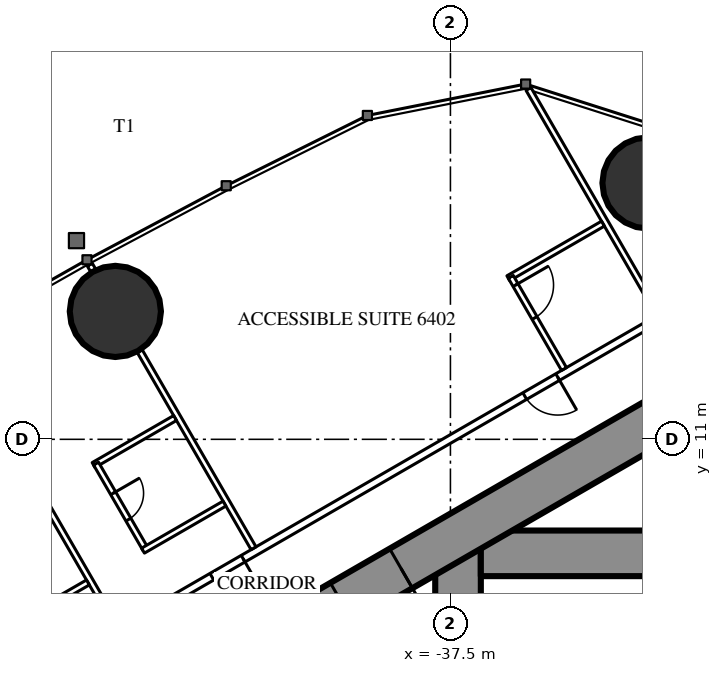
"""IFC4 building model, lengths in metres.
Left out: names, types, materials, properties, quantities, classifications, styles, units other than length and angle.
Written with IfcOpenShell. Run it as: python <this file> out.ifc"""

import sys

from ifc_helpers import new_model, si_unit, direction, frame, frame_2d, origin, origin_2d, place, context, subcontext, project, spatial, rectangle, circle, extrude, element, fill, save


model = new_model("IFC4")
c1 = context("Model", 3, precision=1e-05, world=origin(), true_north=direction((0.0, 1.0)))
c2 = subcontext(c1, "Body", "Model", "MODEL_VIEW")
j1 = project(units=[si_unit("LENGTHUNIT", "METRE"), si_unit("PLANEANGLEUNIT", "RADIAN")], contexts=[c1])
p1 = place(None, origin())
s1 = spatial("IfcSite", under=j1, at=p1, CompositionType="ELEMENT")
p2 = place(p1, origin())
s2 = spatial("IfcBuilding", under=s1, at=p2, CompositionType="ELEMENT")
p3 = place(p2, frame((0.0, 0.0, 240.5)))
s3 = spatial("IfcBuildingStorey", under=s2, at=p3, CompositionType="ELEMENT", Elevation=240.5)
for number, where, z_axis, x_axis in (
    (1, (-32.301, 17.745, 0.0), (0.0, 0.0, 1.0), (1.0, 0.0, 0.0)),
    (2, (-46.317, 14.365, 0.0), (0.0, 0.0, 1.0), (1.0, 0.0, 0.0)),
):
    element("IfcColumn", number, at=place(p3, frame(where, z_axis=z_axis, x_axis=x_axis)), inside=s3, PredefinedType="COLUMN", context=c2, shape_type="SweptSolid", body=[
        extrude(circle(Radius=1.2, at=origin_2d()), origin(), (0.0, 0.0, 1.0), 3.6),
    ])
p4 = place(p3, frame((-37.3, 8.6, 0.0), z_axis=(0.0, 0.0, 1.0), x_axis=(0.0, -1.0, 0.0)))
e3 = element("IfcWall", 3, at=p4, inside=s3, PredefinedType="SHEAR", context=c2, shape_type="SweptSolid", body=[
    extrude(rectangle(XDim=17.2, YDim=1.2, at=frame_2d((8.6, 0.0))), origin(), (0.0, 0.0, 1.0), 3.6),
])
p5 = place(p4, frame((7.7, 0.0, 0.0)))
e4 = element("IfcOpeningElement", 4, at=p5, cuts=e3, PredefinedType="OPENING", context=c2, shape_type="SweptSolid", body=[
    extrude(rectangle(XDim=1.8, YDim=2.2, at=frame_2d((0.9, 1.1))), frame((0.0, 0.61, 0.0), z_axis=(0.0, -1.0, 0.0), x_axis=(1.0, 0.0, 0.0)), (0.0, 0.0, 1.0), 1.22),
])
p6 = place(p3, frame((-28.3, 8.0, 0.0), z_axis=(0.0, 0.0, 1.0), x_axis=(-1.0, 0.0, 0.0)))
e5 = element("IfcWall", 5, at=p6, inside=s3, PredefinedType="SHEAR", context=c2, shape_type="SweptSolid", body=[
    extrude(rectangle(XDim=8.4, YDim=1.2, at=frame_2d((4.2, 0.0))), origin(), (0.0, 0.0, 1.0), 3.6),
])
p7 = place(p6, frame((0.25, 0.0, 0.0)))
e6 = element("IfcOpeningElement", 6, at=p7, cuts=e5, PredefinedType="OPENING", context=c2, shape_type="SweptSolid", body=[
    extrude(rectangle(XDim=1.0, YDim=2.2, at=frame_2d((0.5, 1.1))), frame((0.0, 0.61, 0.0), z_axis=(0.0, -1.0, 0.0), x_axis=(1.0, 0.0, 0.0)), (0.0, 0.0, 1.0), 1.22),
])
p8 = place(p3, frame((-27.2, 14.3, 0.0), z_axis=(0.0, 0.0, 1.0), x_axis=(-0.866026593062, -0.499997940104, 0.0)))
e7 = element("IfcWall", 7, at=p8, inside=s3, PredefinedType="SHEAR", context=c2, shape_type="SweptSolid", body=[
    extrude(rectangle(XDim=28.946, YDim=1.2, at=frame_2d((14.473, 0.0))), origin(), (0.0, 0.0, 1.0), 3.6),
])
p9 = place(p8, frame((4.6, 0.0, 0.0)))
e8 = element("IfcOpeningElement", 8, at=p9, cuts=e7, PredefinedType="OPENING", context=c2, shape_type="SweptSolid", body=[
    extrude(rectangle(XDim=1.0, YDim=2.2, at=frame_2d((0.5, 1.1))), frame((0.0, 0.61, 0.0), z_axis=(0.0, -1.0, 0.0), x_axis=(1.0, 0.0, 0.0)), (0.0, 0.0, 1.0), 1.22),
])
p10 = place(p8, frame((13.395, 0.0, 0.0)))
e9 = element("IfcOpeningElement", 9, at=p10, cuts=e7, PredefinedType="OPENING", context=c2, shape_type="SweptSolid", body=[
    extrude(rectangle(XDim=1.8, YDim=2.2, at=frame_2d((0.9, 1.1))), frame((0.0, 0.61, 0.0), z_axis=(0.0, -1.0, 0.0), x_axis=(1.0, 0.0, 0.0)), (0.0, 0.0, 1.0), 1.22),
])
p11 = place(p3, frame((-28.737, 16.068, 0.0), z_axis=(0.0, 0.0, 1.0), x_axis=(-0.866026057212, -0.499998868229, 0.0)))
e10 = element("IfcWall", 10, at=p11, inside=s3, PredefinedType="PARTITIONING", context=c2, shape_type="SweptSolid", body=[
    extrude(rectangle(XDim=32.137, YDim=0.2, at=frame_2d((16.068, 0.0))), origin(), (0.0, 0.0, 1.0), 3.35),
])
p12 = place(p11, frame((1.08, 0.0, 0.0)))
e11 = element("IfcOpeningElement", 11, at=p12, cuts=e10, PredefinedType="OPENING", context=c2, shape_type="SweptSolid", body=[
    extrude(rectangle(XDim=1.8, YDim=2.03, at=frame_2d((0.9, 1.015))), frame((0.0, 0.11, 0.0), z_axis=(0.0, -1.0, 0.0), x_axis=(1.0, 0.0, 0.0)), (0.0, 0.0, 1.0), 0.22),
])
p13 = place(p11, frame((6.86, 0.0, 0.0)))
e12 = element("IfcOpeningElement", 12, at=p13, cuts=e10, PredefinedType="OPENING", context=c2, shape_type="SweptSolid", body=[
    extrude(rectangle(XDim=1.0, YDim=2.2, at=frame_2d((0.5, 1.1))), frame((0.0, 0.11, 0.0), z_axis=(0.0, -1.0, 0.0), x_axis=(1.0, 0.0, 0.0)), (0.0, 0.0, 1.0), 0.22),
])
p14 = place(p11, frame((16.418, 0.0, 0.0)))
e13 = element("IfcOpeningElement", 13, at=p14, cuts=e10, PredefinedType="OPENING", context=c2, shape_type="SweptSolid", body=[
    extrude(rectangle(XDim=0.95, YDim=2.2, at=frame_2d((0.475, 1.1))), frame((0.0, 0.11, 0.0), z_axis=(0.0, -1.0, 0.0), x_axis=(1.0, 0.0, 0.0)), (0.0, 0.0, 1.0), 0.22),
])
p15 = place(p11, frame((20.567, 0.0, 0.0)))
e14 = element("IfcOpeningElement", 14, at=p15, cuts=e10, PredefinedType="OPENING", context=c2, shape_type="SweptSolid", body=[
    extrude(rectangle(XDim=0.95, YDim=2.2, at=frame_2d((0.475, 1.1))), frame((0.0, 0.11, 0.0), z_axis=(0.0, -1.0, 0.0), x_axis=(1.0, 0.0, 0.0)), (0.0, 0.0, 1.0), 0.22),
])
p16 = place(p11, frame((27.065, 0.0, 0.0)))
e15 = element("IfcOpeningElement", 15, at=p16, cuts=e10, PredefinedType="OPENING", context=c2, shape_type="SweptSolid", body=[
    extrude(rectangle(XDim=0.95, YDim=2.2, at=frame_2d((0.475, 1.1))), frame((0.0, 0.11, 0.0), z_axis=(0.0, -1.0, 0.0), x_axis=(1.0, 0.0, 0.0)), (0.0, 0.0, 1.0), 0.22),
])
p17 = place(p3, frame((-32.022, 14.287, 0.0), z_axis=(0.0, 0.0, 1.0), x_axis=(-0.50000019414, 0.866025291697, 0.0)))
e16 = element("IfcWall", 16, at=p17, inside=s3, PredefinedType="PARTITIONING", context=c2, shape_type="SweptSolid", body=[
    extrude(rectangle(XDim=6.848, YDim=0.15, at=frame_2d((3.424, 0.0))), origin(), (0.0, 0.0, 1.0), 3.35),
])
p18 = place(p3, frame((-42.68, 8.134, 0.0), z_axis=(0.0, 0.0, 1.0), x_axis=(-0.499984479505, 0.866034364361, 0.0)))
e17 = element("IfcWall", 17, at=p18, inside=s3, PredefinedType="PARTITIONING", context=c2, shape_type="SweptSolid", body=[
    extrude(rectangle(XDim=5.995, YDim=0.15, at=frame_2d((2.998, 0.0))), origin(), (0.0, 0.0, 1.0), 2.45),
])
p19 = place(p3, frame((-46.898, 15.439, 0.0), z_axis=(0.0, 0.0, 1.0), x_axis=(-0.500232303069, 0.865891241997, 0.0)))
e18 = element("IfcWall", 18, at=p19, inside=s3, PredefinedType="PARTITIONING", context=c2, shape_type="SweptSolid", body=[
    extrude(rectangle(XDim=0.18, YDim=0.15, at=frame_2d((0.09, 0.0))), origin(), (0.0, 0.0, 1.0), 2.45),
])
p20 = place(p3, frame((-46.274, 6.059, 0.0), z_axis=(0.0, 0.0, 1.0), x_axis=(-0.500020471368, 0.866013584312, 0.0)))
e19 = element("IfcWall", 19, at=p20, inside=s3, PredefinedType="PARTITIONING", context=c2, shape_type="SweptSolid", body=[
    extrude(rectangle(XDim=6.028, YDim=0.15, at=frame_2d((3.014, 0.0))), origin(), (0.0, 0.0, 1.0), 2.45),
])
p21 = place(p3, frame((-33.487, 16.675, 0.0), z_axis=(0.0, 0.0, 1.0), x_axis=(-0.866039941686, -0.499974818771, 0.0)))
e20 = element("IfcWall", 20, at=p21, inside=s3, PredefinedType="PARTITIONING", context=c2, shape_type="SweptSolid", body=[
    extrude(rectangle(XDim=2.875, YDim=0.15, at=frame_2d((1.438, 0.0))), origin(), (0.0, 0.0, 1.0), 3.35),
])
p22 = place(p3, frame((-34.511, 12.85, 0.0), z_axis=(0.0, 0.0, 1.0), x_axis=(-0.500011755427, 0.866018616679, 0.0)))
e21 = element("IfcWall", 21, at=p22, inside=s3, PredefinedType="PARTITIONING", context=c2, shape_type="SweptSolid", body=[
    extrude(rectangle(XDim=2.8, YDim=0.15, at=frame_2d((1.4, 0.0))), origin(), (0.0, 0.0, 1.0), 3.35),
])
p23 = place(p22, frame((1.55, 0.0, 0.0)))
e22 = element("IfcOpeningElement", 22, at=p23, cuts=e21, PredefinedType="OPENING", context=c2, shape_type="SweptSolid", body=[
    extrude(rectangle(XDim=1.0, YDim=2.2, at=frame_2d((0.5, 1.1))), frame((0.0, 0.085, 0.0), z_axis=(0.0, -1.0, 0.0), x_axis=(1.0, 0.0, 0.0)), (0.0, 0.0, 1.0), 0.17),
])
p24 = place(p3, frame((-44.745, 11.56, 0.0), z_axis=(0.0, 0.0, 1.0), x_axis=(-0.866006523861, -0.500032699561, 0.0)))
e23 = element("IfcWall", 23, at=p24, inside=s3, PredefinedType="PARTITIONING", context=c2, shape_type="SweptSolid", body=[
    extrude(rectangle(XDim=2.475, YDim=0.15, at=frame_2d((1.237, 0.0))), origin(), (0.0, 0.0, 1.0), 3.35),
])
p25 = place(p3, frame((-45.524, 8.109, 0.0), z_axis=(0.0, 0.0, 1.0), x_axis=(-0.49997716683, 0.86603858612, 0.0)))
e24 = element("IfcWall", 24, at=p25, inside=s3, PredefinedType="PARTITIONING", context=c2, shape_type="SweptSolid", body=[
    extrude(rectangle(XDim=2.6, YDim=0.15, at=frame_2d((1.3, 0.0))), origin(), (0.0, 0.0, 1.0), 3.35),
])
p26 = place(p25, frame((0.9, 0.0, 0.0)))
e25 = element("IfcOpeningElement", 25, at=p26, cuts=e24, PredefinedType="OPENING", context=c2, shape_type="SweptSolid", body=[
    extrude(rectangle(XDim=0.8, YDim=2.2, at=frame_2d((0.4, 1.1))), frame((0.0, 0.085, 0.0), z_axis=(0.0, -1.0, 0.0), x_axis=(1.0, 0.0, 0.0)), (0.0, 0.0, 1.0), 0.17),
])
for number, where, z_axis, x_axis in (
    (26, (-43.445, 9.309, 0.0), (0.0, 0.0, 1.0), (-0.866, -0.5, 0.0)),
    (27, (-47.039, 7.234, 0.0), (0.0, 0.0, 1.0), (-0.866, -0.5, 0.0)),
):
    element("IfcWall", number, at=place(p3, frame(where, z_axis=z_axis, x_axis=x_axis)), inside=s3, PredefinedType="PARTITIONING", context=c2, shape_type="SweptSolid", body=[
        extrude(rectangle(XDim=2.475, YDim=0.15, at=frame_2d((1.238, 0.0))), origin(), (0.0, 0.0, 1.0), 3.35),
    ])
p27 = place(p23, origin())
e28 = element("IfcDoor", 28, at=p27, inside=s3, OperationType="SINGLE_SWING_RIGHT", PredefinedType="DOOR", context=c2, shape_type="SweptSolid", body=[
    extrude(rectangle(XDim=1.0, YDim=2.2, at=frame_2d((0.5, 1.1))), frame((0.0, 0.025, 0.0), z_axis=(0.0, -1.0, 0.0), x_axis=(1.0, 0.0, 0.0)), (0.0, 0.0, 1.0), 0.05),
])
fill(e22, e28)
p28 = place(p13, origin())
e29 = element("IfcDoor", 29, at=p28, inside=s3, OperationType="SINGLE_SWING_LEFT", PredefinedType="DOOR", context=c2, shape_type="SweptSolid", body=[
    extrude(rectangle(XDim=1.0, YDim=2.2, at=frame_2d((0.5, 1.1))), frame((0.0, 0.025, 0.0), z_axis=(0.0, -1.0, 0.0), x_axis=(1.0, 0.0, 0.0)), (0.0, 0.0, 1.0), 0.05),
])
fill(e12, e29)
p29 = place(p26, origin())
e30 = element("IfcDoor", 30, at=p29, inside=s3, OperationType="SINGLE_SWING_RIGHT", PredefinedType="DOOR", context=c2, shape_type="SweptSolid", body=[
    extrude(rectangle(XDim=0.8, YDim=2.2, at=frame_2d((0.4, 1.1))), frame((0.0, 0.025, 0.0), z_axis=(0.0, -1.0, 0.0), x_axis=(1.0, 0.0, 0.0)), (0.0, 0.0, 1.0), 0.05),
])
fill(e25, e30)
p30 = place(p14, origin())
e31 = element("IfcDoor", 31, at=p30, inside=s3, OperationType="SINGLE_SWING_LEFT", PredefinedType="DOOR", context=c2, shape_type="SweptSolid", body=[
    extrude(rectangle(XDim=0.95, YDim=2.2, at=frame_2d((0.475, 1.1))), frame((0.0, 0.025, 0.0), z_axis=(0.0, -1.0, 0.0), x_axis=(1.0, 0.0, 0.0)), (0.0, 0.0, 1.0), 0.05),
])
fill(e13, e31)
p31 = place(p10, origin())
e32 = element("IfcDoor", 32, at=p31, inside=s3, OperationType="DOUBLE_DOOR_SINGLE_SWING", PredefinedType="DOOR", context=c2, shape_type="SweptSolid", body=[
    extrude(rectangle(XDim=1.8, YDim=2.2, at=frame_2d((0.9, 1.1))), frame((0.0, 0.025, 0.0), z_axis=(0.0, -1.0, 0.0), x_axis=(1.0, 0.0, 0.0)), (0.0, 0.0, 1.0), 0.05),
])
fill(e9, e32)
save(model, sys.argv[1])
